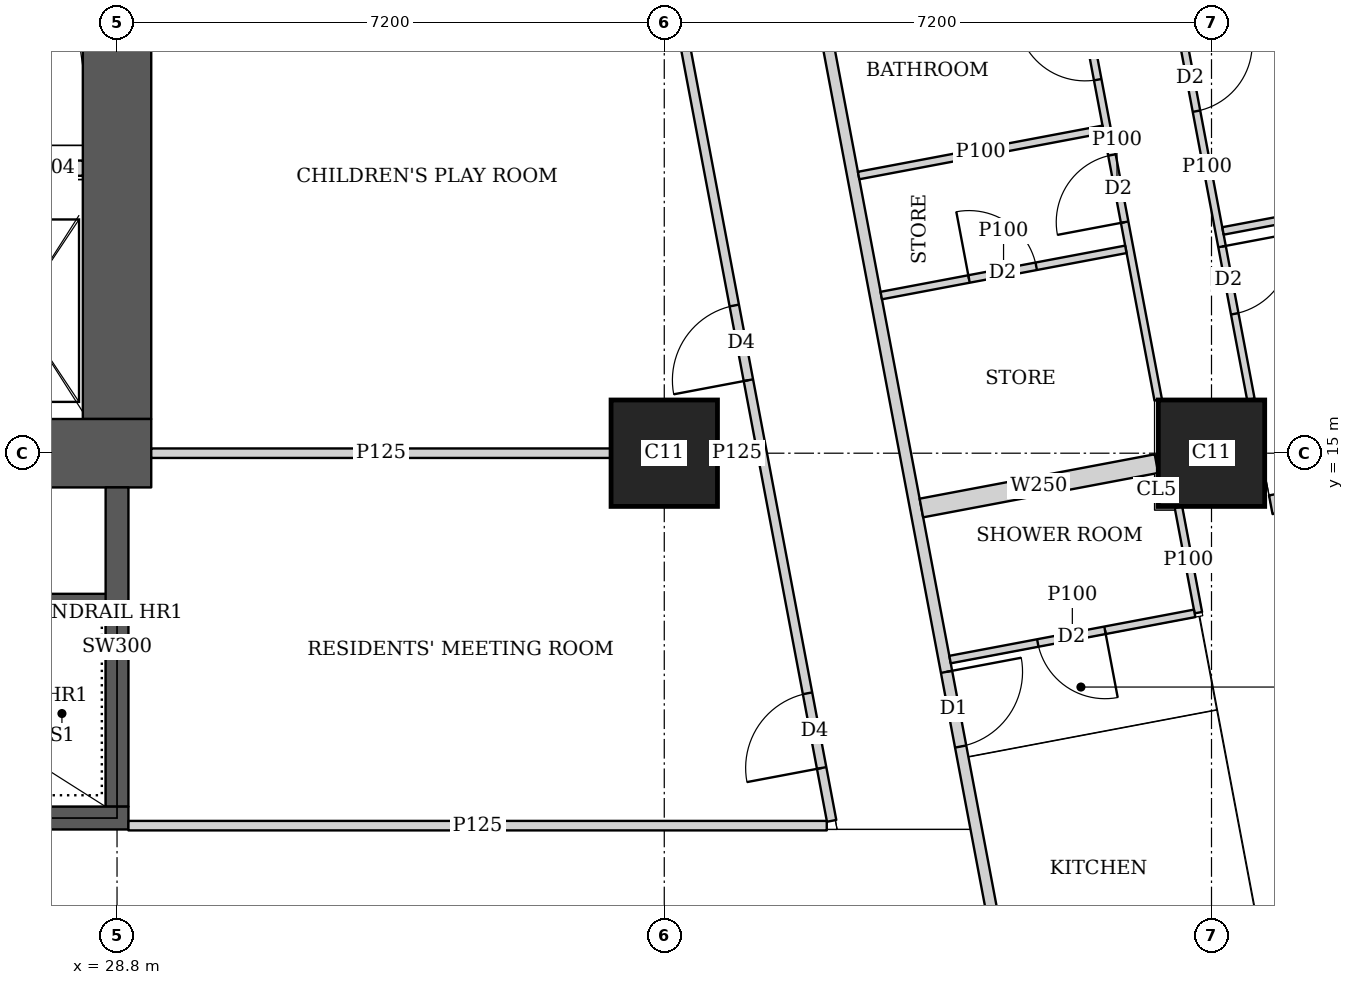
"""IFC4 building model, lengths in metres.
Left out: names, types, materials, properties, quantities, classifications, styles, units other than length and angle.
Written with IfcOpenShell. Run it as: python <this file> out.ifc"""

import sys

from ifc_helpers import new_model, si_unit, direction, frame, frame_2d, origin, origin_2d, place, context, subcontext, project, spatial, rectangle, extrude, element, fill, save


model = new_model("IFC4")
c1 = context("Model", 3, precision=1e-05, world=origin(), true_north=direction((0.0, 1.0)))
c2 = subcontext(c1, "Body", "Model", "MODEL_VIEW")
j1 = project(units=[si_unit("LENGTHUNIT", "METRE"), si_unit("PLANEANGLEUNIT", "RADIAN")], contexts=[c1])
p1 = place(None, origin())
s1 = spatial("IfcSite", under=j1, at=p1, CompositionType="ELEMENT")
p2 = place(p1, origin())
s2 = spatial("IfcBuilding", under=s1, at=p2, CompositionType="ELEMENT")
p3 = place(p2, frame((0.0, 0.0, 270.35)))
s3 = spatial("IfcBuildingStorey", under=s2, at=p3, CompositionType="ELEMENT", Elevation=270.35)
for number, where, z_axis, x_axis in (
    (1, (36.0, 15.0, 0.0), (0.0, 0.0, 1.0), (1.0, 0.0, 0.0)),
    (2, (43.2, 15.0, 0.0), (0.0, 0.0, 1.0), (1.0, 0.0, 0.0)),
):
    element("IfcColumn", number, at=place(p3, frame(where, z_axis=z_axis, x_axis=x_axis)), inside=s3, PredefinedType="COLUMN", context=c2, shape_type="SweptSolid", body=[
        extrude(rectangle(XDim=1.4, YDim=1.4, at=origin_2d()), origin(), (0.0, 0.0, 1.0), 3.75),
    ])
p4 = place(p3, frame((13.95, 15.0, 0.0), z_axis=(0.0, 0.0, 1.0), x_axis=(1.0, 0.0, 0.0)))
e3 = element("IfcWall", 3, at=p4, inside=s3, PredefinedType="SHEAR", context=c2, shape_type="SweptSolid", body=[
    extrude(rectangle(XDim=15.3, YDim=0.9, at=frame_2d((7.65, 0.0))), origin(), (0.0, 0.0, 1.0), 3.75),
])
p5 = place(p4, frame((4.45, 0.0, 0.0)))
e4 = element("IfcOpeningElement", 4, at=p5, cuts=e3, PredefinedType="OPENING", context=c2, shape_type="SweptSolid", body=[
    extrude(rectangle(XDim=1.8, YDim=2.1, at=frame_2d((0.9, 1.05))), frame((0.0, 0.46, 0.0), z_axis=(0.0, -1.0, 0.0), x_axis=(1.0, 0.0, 0.0)), (0.0, 0.0, 1.0), 0.92),
])
p6 = place(p4, frame((10.7, 0.0, 0.0)))
e5 = element("IfcOpeningElement", 5, at=p6, cuts=e3, PredefinedType="OPENING", context=c2, shape_type="SweptSolid", body=[
    extrude(rectangle(XDim=1.1, YDim=2.1, at=frame_2d((0.55, 1.05))), frame((0.0, 0.46, 0.0), z_axis=(0.0, -1.0, 0.0), x_axis=(1.0, 0.0, 0.0)), (0.0, 0.0, 1.0), 0.92),
])
p7 = place(p3, frame((28.8, 15.45, 0.0), z_axis=(0.0, 0.0, 1.0), x_axis=(0.0, 1.0, 0.0)))
e6 = element("IfcWall", 6, at=p7, inside=s3, PredefinedType="SHEAR", context=c2, shape_type="SweptSolid", body=[
    extrude(rectangle(XDim=14.1, YDim=0.9, at=frame_2d((7.05, 0.0))), origin(), (0.0, 0.0, 1.0), 3.75),
])
p8 = place(p3, frame((21.45, 10.2, 0.0), z_axis=(0.0, 0.0, 1.0), x_axis=(1.0, 0.0, 0.0)))
e7 = element("IfcWall", 7, at=p8, inside=s3, PredefinedType="SHEAR", context=c2, shape_type="SweptSolid", body=[
    extrude(rectangle(XDim=7.5, YDim=0.3, at=frame_2d((3.75, 0.0))), origin(), (0.0, 0.0, 1.0), 3.75),
])
p9 = place(p8, frame((1.2, 0.0, 0.0)))
e8 = element("IfcOpeningElement", 8, at=p9, cuts=e7, PredefinedType="OPENING", context=c2, shape_type="SweptSolid", body=[
    extrude(rectangle(XDim=1.1, YDim=2.1, at=frame_2d((0.55, 1.05))), frame((0.0, 0.16, 0.0), z_axis=(0.0, -1.0, 0.0), x_axis=(1.0, 0.0, 0.0)), (0.0, 0.0, 1.0), 0.32),
])
p10 = place(p3, frame((28.8, 10.35, 0.0), z_axis=(0.0, 0.0, 1.0), x_axis=(0.0, 1.0, 0.0)))
e9 = element("IfcWall", 9, at=p10, inside=s3, PredefinedType="SHEAR", context=c2, shape_type="SweptSolid", body=[
    extrude(rectangle(XDim=4.2, YDim=0.3, at=frame_2d((2.1, 0.0))), origin(), (0.0, 0.0, 1.0), 3.75),
])
p11 = place(p3, frame((49.684, 7.832, 0.0), z_axis=(0.0, 0.0, 1.0), x_axis=(-0.185616669694, 0.982622232565, 0.0)))
e10 = element("IfcWall", 10, at=p11, inside=s3, PredefinedType="SOLIDWALL", context=c2, shape_type="SweptSolid", body=[
    extrude(rectangle(XDim=36.0, YDim=0.2, at=frame_2d((18.0, 0.0))), origin(), (0.0, 0.0, 1.0), 3.5),
])
p12 = place(p11, frame((2.518, 0.0, 0.9)))
e11 = element("IfcOpeningElement", 11, at=p12, cuts=e10, PredefinedType="OPENING", context=c2, shape_type="SweptSolid", body=[
    extrude(rectangle(XDim=2.4, YDim=1.5, at=frame_2d((1.2, 0.75))), frame((0.0, 0.11, 0.0), z_axis=(0.0, -1.0, 0.0), x_axis=(1.0, 0.0, 0.0)), (0.0, 0.0, 1.0), 0.22),
])
p13 = place(p11, frame((8.444, 0.0, 0.9)))
e12 = element("IfcOpeningElement", 12, at=p13, cuts=e10, PredefinedType="OPENING", context=c2, shape_type="SweptSolid", body=[
    extrude(rectangle(XDim=1.8, YDim=1.5, at=frame_2d((0.9, 0.75))), frame((0.0, 0.11, 0.0), z_axis=(0.0, -1.0, 0.0), x_axis=(1.0, 0.0, 0.0)), (0.0, 0.0, 1.0), 0.22),
])
p14 = place(p11, frame((12.261, 0.0, 0.9)))
e13 = element("IfcOpeningElement", 13, at=p14, cuts=e10, PredefinedType="OPENING", context=c2, shape_type="SweptSolid", body=[
    extrude(rectangle(XDim=1.8, YDim=1.5, at=frame_2d((0.9, 0.75))), frame((0.0, 0.11, 0.0), z_axis=(0.0, -1.0, 0.0), x_axis=(1.0, 0.0, 0.0)), (0.0, 0.0, 1.0), 0.22),
])
p15 = place(p11, frame((16.078, 0.0, 0.9)))
e14 = element("IfcOpeningElement", 14, at=p15, cuts=e10, PredefinedType="OPENING", context=c2, shape_type="SweptSolid", body=[
    extrude(rectangle(XDim=1.8, YDim=1.5, at=frame_2d((0.9, 0.75))), frame((0.0, 0.11, 0.0), z_axis=(0.0, -1.0, 0.0), x_axis=(1.0, 0.0, 0.0)), (0.0, 0.0, 1.0), 0.22),
])
p16 = place(p11, frame((19.894, 0.0, 0.9)))
e15 = element("IfcOpeningElement", 15, at=p16, cuts=e10, PredefinedType="OPENING", context=c2, shape_type="SweptSolid", body=[
    extrude(rectangle(XDim=1.8, YDim=1.5, at=frame_2d((0.9, 0.75))), frame((0.0, 0.11, 0.0), z_axis=(0.0, -1.0, 0.0), x_axis=(1.0, 0.0, 0.0)), (0.0, 0.0, 1.0), 0.22),
])
p17 = place(p11, frame((23.71, 0.0, 0.9)))
e16 = element("IfcOpeningElement", 16, at=p17, cuts=e10, PredefinedType="OPENING", context=c2, shape_type="SweptSolid", body=[
    extrude(rectangle(XDim=1.8, YDim=1.5, at=frame_2d((0.9, 0.75))), frame((0.0, 0.11, 0.0), z_axis=(0.0, -1.0, 0.0), x_axis=(1.0, 0.0, 0.0)), (0.0, 0.0, 1.0), 0.22),
])
p18 = place(p11, frame((27.526, 0.0, 0.9)))
e17 = element("IfcOpeningElement", 17, at=p18, cuts=e10, PredefinedType="OPENING", context=c2, shape_type="SweptSolid", body=[
    extrude(rectangle(XDim=1.8, YDim=1.5, at=frame_2d((0.9, 0.75))), frame((0.0, 0.11, 0.0), z_axis=(0.0, -1.0, 0.0), x_axis=(1.0, 0.0, 0.0)), (0.0, 0.0, 1.0), 0.22),
])
p19 = place(p11, frame((32.046, 0.0, 0.9)))
e18 = element("IfcOpeningElement", 18, at=p19, cuts=e10, PredefinedType="OPENING", context=c2, shape_type="SweptSolid", body=[
    extrude(rectangle(XDim=1.8, YDim=1.5, at=frame_2d((0.9, 0.75))), frame((0.0, 0.11, 0.0), z_axis=(0.0, -1.0, 0.0), x_axis=(1.0, 0.0, 0.0)), (0.0, 0.0, 1.0), 0.22),
])
p20 = place(p3, frame((34.036, 42.186, 0.0), z_axis=(0.0, 0.0, 1.0), x_axis=(0.185593518645, -0.9826266055, 0.0)))
e19 = element("IfcWall", 19, at=p20, inside=s3, PredefinedType="SOLIDWALL", context=c2, shape_type="SweptSolid", body=[
    extrude(rectangle(XDim=35.961, YDim=0.15, at=frame_2d((17.98, 0.0))), origin(), (0.0, 0.0, 1.0), 2.5),
])
p21 = place(p20, frame((15.529, 0.0, 0.0)))
e20 = element("IfcOpeningElement", 20, at=p21, cuts=e19, PredefinedType="OPENING", context=c2, shape_type="SweptSolid", body=[
    extrude(rectangle(XDim=1.0, YDim=2.1, at=frame_2d((0.5, 1.05))), frame((0.0, 0.085, 0.0), z_axis=(0.0, -1.0, 0.0), x_axis=(1.0, 0.0, 0.0)), (0.0, 0.0, 1.0), 0.17),
])
p22 = place(p20, frame((19.345, 0.0, 0.0)))
e21 = element("IfcOpeningElement", 21, at=p22, cuts=e19, PredefinedType="OPENING", context=c2, shape_type="SweptSolid", body=[
    extrude(rectangle(XDim=1.0, YDim=2.1, at=frame_2d((0.5, 1.05))), frame((0.0, 0.085, 0.0), z_axis=(0.0, -1.0, 0.0), x_axis=(1.0, 0.0, 0.0)), (0.0, 0.0, 1.0), 0.17),
])
p23 = place(p20, frame((30.594, 0.0, 0.0)))
e22 = element("IfcOpeningElement", 22, at=p23, cuts=e19, PredefinedType="OPENING", context=c2, shape_type="SweptSolid", body=[
    extrude(rectangle(XDim=1.0, YDim=2.1, at=frame_2d((0.5, 1.05))), frame((0.0, 0.085, 0.0), z_axis=(0.0, -1.0, 0.0), x_axis=(1.0, 0.0, 0.0)), (0.0, 0.0, 1.0), 0.17),
])
p24 = place(p3, frame((42.566, 21.809, 0.0), z_axis=(0.0, 0.0, 1.0), x_axis=(0.185613526435, -0.98262282632, 0.0)))
e23 = element("IfcWall", 23, at=p24, inside=s3, PredefinedType="PARTITIONING", context=c2, shape_type="SweptSolid", body=[
    extrude(rectangle(XDim=6.207, YDim=0.1, at=frame_2d((3.104, 0.0))), origin(), (0.0, 0.0, 1.0), 2.5),
])
p25 = place(p24, frame((1.45, 0.0, 0.0)))
e24 = element("IfcOpeningElement", 24, at=p25, cuts=e23, PredefinedType="OPENING", context=c2, shape_type="SweptSolid", body=[
    extrude(rectangle(XDim=0.9, YDim=2.1, at=frame_2d((0.45, 1.05))), frame((0.0, 0.06, 0.0), z_axis=(0.0, -1.0, 0.0), x_axis=(1.0, 0.0, 0.0)), (0.0, 0.0, 1.0), 0.12),
])
p26 = place(p24, frame((4.163, 0.0, 0.0)))
e25 = element("IfcOpeningElement", 25, at=p26, cuts=e23, PredefinedType="OPENING", context=c2, shape_type="SweptSolid", body=[
    extrude(rectangle(XDim=0.9, YDim=2.1, at=frame_2d((0.45, 1.05))), frame((0.0, 0.06, 0.0), z_axis=(0.0, -1.0, 0.0), x_axis=(1.0, 0.0, 0.0)), (0.0, 0.0, 1.0), 0.12),
])
p27 = place(p3, frame((41.414, 21.442, 0.0), z_axis=(0.0, 0.0, 1.0), x_axis=(0.185698675093, -0.982606738257, 0.0)))
e26 = element("IfcWall", 26, at=p27, inside=s3, PredefinedType="PARTITIONING", context=c2, shape_type="SweptSolid", body=[
    extrude(rectangle(XDim=5.843, YDim=0.1, at=frame_2d((2.921, 0.0))), origin(), (0.0, 0.0, 1.0), 3.5),
])
p28 = place(p27, frame((0.655, 0.0, 0.0)))
e27 = element("IfcOpeningElement", 27, at=p28, cuts=e26, PredefinedType="OPENING", context=c2, shape_type="SweptSolid", body=[
    extrude(rectangle(XDim=0.9, YDim=2.1, at=frame_2d((0.45, 1.05))), frame((0.0, 0.06, 0.0), z_axis=(0.0, -1.0, 0.0), x_axis=(1.0, 0.0, 0.0)), (0.0, 0.0, 1.0), 0.12),
])
p29 = place(p27, frame((2.563, 0.0, 0.0)))
e28 = element("IfcOpeningElement", 28, at=p29, cuts=e26, PredefinedType="OPENING", context=c2, shape_type="SweptSolid", body=[
    extrude(rectangle(XDim=0.9, YDim=2.1, at=frame_2d((0.45, 1.05))), frame((0.0, 0.06, 0.0), z_axis=(0.0, -1.0, 0.0), x_axis=(1.0, 0.0, 0.0)), (0.0, 0.0, 1.0), 0.12),
])
p30 = place(p3, frame((47.527, 18.712, 0.0), z_axis=(0.0, 0.0, 1.0), x_axis=(-0.982665405803, -0.185387972203, 0.0)))
e29 = element("IfcWall", 29, at=p30, inside=s3, PredefinedType="PARTITIONING", context=c2, shape_type="SweptSolid", body=[
    extrude(rectangle(XDim=4.25, YDim=0.1, at=frame_2d((2.125, 0.0))), origin(), (0.0, 0.0, 1.0), 2.5),
])
p31 = place(p3, frame((42.073, 17.682, 0.0), z_axis=(0.0, 0.0, 1.0), x_axis=(-0.982620626894, -0.185625169636, 0.0)))
e30 = element("IfcWall", 30, at=p31, inside=s3, PredefinedType="PARTITIONING", context=c2, shape_type="SweptSolid", body=[
    extrude(rectangle(XDim=3.275, YDim=0.1, at=frame_2d((1.637, 0.0))), origin(), (0.0, 0.0, 1.0), 3.5),
])
p32 = place(p31, frame((1.2, 0.0, 0.0)))
e31 = element("IfcOpeningElement", 31, at=p32, cuts=e30, PredefinedType="OPENING", context=c2, shape_type="SweptSolid", body=[
    extrude(rectangle(XDim=0.9, YDim=2.1, at=frame_2d((0.45, 1.05))), frame((0.0, 0.06, 0.0), z_axis=(0.0, -1.0, 0.0), x_axis=(1.0, 0.0, 0.0)), (0.0, 0.0, 1.0), 0.12),
])
p33 = place(p3, frame((41.775, 19.261, 0.0), z_axis=(0.0, 0.0, 1.0), x_axis=(-0.982620626894, -0.185625169636, 0.0)))
e32 = element("IfcWall", 32, at=p33, inside=s3, PredefinedType="PARTITIONING", context=c2, shape_type="SweptSolid", body=[
    extrude(rectangle(XDim=3.275, YDim=0.1, at=frame_2d((1.637, 0.0))), origin(), (0.0, 0.0, 1.0), 3.5),
])
p34 = place(p3, frame((42.765, 14.29, 0.0), z_axis=(0.0, 0.0, 1.0), x_axis=(0.185634589628, -0.982618847333, 0.0)))
e33 = element("IfcWall", 33, at=p34, inside=s3, PredefinedType="PARTITIONING", context=c2, shape_type="SweptSolid", body=[
    extrude(rectangle(XDim=1.413, YDim=0.1, at=frame_2d((0.706, 0.0))), origin(), (0.0, 0.0, 1.0), 3.5),
])
p35 = place(p3, frame((42.978, 12.893, 0.0), z_axis=(0.0, 0.0, 1.0), x_axis=(-0.982607026909, -0.185697147715, 0.0)))
e34 = element("IfcWall", 34, at=p35, inside=s3, PredefinedType="PARTITIONING", context=c2, shape_type="SweptSolid", body=[
    extrude(rectangle(XDim=3.275, YDim=0.1, at=frame_2d((1.637, 0.0))), origin(), (0.0, 0.0, 1.0), 3.5),
])
p36 = place(p35, frame((1.2, 0.0, 0.0)))
e35 = element("IfcOpeningElement", 35, at=p36, cuts=e34, PredefinedType="OPENING", context=c2, shape_type="SweptSolid", body=[
    extrude(rectangle(XDim=0.9, YDim=2.1, at=frame_2d((0.45, 1.05))), frame((0.0, 0.06, 0.0), z_axis=(0.0, -1.0, 0.0), x_axis=(1.0, 0.0, 0.0)), (0.0, 0.0, 1.0), 0.12),
])
p37 = place(p3, frame((45.29, 14.569, 0.0), z_axis=(0.0, 0.0, 1.0), x_axis=(-0.982676759201, -0.185327782391, 0.0)))
e36 = element("IfcWall", 36, at=p37, inside=s3, PredefinedType="SOLIDWALL", context=c2, shape_type="SweptSolid", body=[
    extrude(rectangle(XDim=1.333, YDim=0.25, at=frame_2d((0.667, 0.0))), origin(), (0.0, 0.0, 1.0), 3.5),
])
p38 = place(p3, frame((42.476, 14.863, 0.0), z_axis=(0.0, 0.0, 1.0), x_axis=(-0.982638716117, -0.185529387398, 0.0)))
e37 = element("IfcWall", 37, at=p38, inside=s3, PredefinedType="SOLIDWALL", context=c2, shape_type="SweptSolid", body=[
    extrude(rectangle(XDim=3.148, YDim=0.25, at=frame_2d((1.574, 0.0))), origin(), (0.0, 0.0, 1.0), 3.5),
])
p39 = place(p3, frame((28.95, 10.1, 0.0), z_axis=(0.0, 0.0, 1.0), x_axis=(1.0, 0.0, 0.0)))
e38 = element("IfcWall", 38, at=p39, inside=s3, PredefinedType="PARTITIONING", context=c2, shape_type="SweptSolid", body=[
    extrude(rectangle(XDim=9.188, YDim=0.125, at=frame_2d((4.594, 0.0))), origin(), (0.0, 0.0, 1.0), 3.5),
])
p40 = place(p3, frame((38.202, 10.163, 0.0), z_axis=(0.0, 0.0, 1.0), x_axis=(-0.185610321132, 0.982623431783, 0.0)))
e39 = element("IfcWall", 39, at=p40, inside=s3, PredefinedType="PARTITIONING", context=c2, shape_type="SweptSolid", body=[
    extrude(rectangle(XDim=25.111, YDim=0.125, at=frame_2d((12.556, 0.0))), origin(), (0.0, 0.0, 1.0), 2.5),
])
p41 = place(p40, frame((0.708, 0.0, 0.0)))
e40 = element("IfcOpeningElement", 40, at=p41, cuts=e39, PredefinedType="OPENING", context=c2, shape_type="SweptSolid", body=[
    extrude(rectangle(XDim=1.0, YDim=2.1, at=frame_2d((0.5, 1.05))), frame((0.0, 0.073, 0.0), z_axis=(0.0, -1.0, 0.0), x_axis=(1.0, 0.0, 0.0)), (0.0, 0.0, 1.0), 0.145),
])
p42 = place(p40, frame((5.9, 0.0, 0.0)))
e41 = element("IfcOpeningElement", 41, at=p42, cuts=e39, PredefinedType="OPENING", context=c2, shape_type="SweptSolid", body=[
    extrude(rectangle(XDim=1.0, YDim=2.1, at=frame_2d((0.5, 1.05))), frame((0.0, 0.073, 0.0), z_axis=(0.0, -1.0, 0.0), x_axis=(1.0, 0.0, 0.0)), (0.0, 0.0, 1.0), 0.145),
])
p43 = place(p40, frame((13.378, 0.0, 0.0)))
e42 = element("IfcOpeningElement", 42, at=p43, cuts=e39, PredefinedType="OPENING", context=c2, shape_type="SweptSolid", body=[
    extrude(rectangle(XDim=1.0, YDim=2.1, at=frame_2d((0.5, 1.05))), frame((0.0, 0.073, 0.0), z_axis=(0.0, -1.0, 0.0), x_axis=(1.0, 0.0, 0.0)), (0.0, 0.0, 1.0), 0.145),
])
p44 = place(p40, frame((17.194, 0.0, 0.0)))
e43 = element("IfcOpeningElement", 43, at=p44, cuts=e39, PredefinedType="OPENING", context=c2, shape_type="SweptSolid", body=[
    extrude(rectangle(XDim=1.0, YDim=2.1, at=frame_2d((0.5, 1.05))), frame((0.0, 0.073, 0.0), z_axis=(0.0, -1.0, 0.0), x_axis=(1.0, 0.0, 0.0)), (0.0, 0.0, 1.0), 0.145),
])
p45 = place(p40, frame((21.15, 0.0, 0.0)))
e44 = element("IfcOpeningElement", 44, at=p45, cuts=e39, PredefinedType="OPENING", context=c2, shape_type="SweptSolid", body=[
    extrude(rectangle(XDim=1.0, YDim=2.1, at=frame_2d((0.5, 1.05))), frame((0.0, 0.073, 0.0), z_axis=(0.0, -1.0, 0.0), x_axis=(1.0, 0.0, 0.0)), (0.0, 0.0, 1.0), 0.145),
])
p46 = place(p3, frame((29.25, 15.0, 0.0), z_axis=(0.0, 0.0, 1.0), x_axis=(1.0, 0.0, 0.0)))
e45 = element("IfcWall", 45, at=p46, inside=s3, PredefinedType="PARTITIONING", context=c2, shape_type="SweptSolid", body=[
    extrude(rectangle(XDim=6.049, YDim=0.125, at=frame_2d((3.024, 0.0))), origin(), (0.0, 0.0, 1.0), 3.5),
])
p47 = place(p3, frame((36.701, 15.0, 0.0), z_axis=(0.0, 0.0, 1.0), x_axis=(1.0, 0.0, 0.0)))
e46 = element("IfcWall", 46, at=p47, inside=s3, PredefinedType="PARTITIONING", context=c2, shape_type="SweptSolid", body=[
    extrude(rectangle(XDim=0.512, YDim=0.125, at=frame_2d((0.256, 0.0))), origin(), (0.0, 0.0, 1.0), 3.5),
])
p48 = place(p3, frame((23.0, 13.05, 0.0), z_axis=(0.0, 0.0, 1.0), x_axis=(1.0, 0.0, 0.0)))
e47 = element("IfcWall", 47, at=p48, inside=s3, PredefinedType="SHEAR", context=c2, shape_type="SweptSolid", body=[
    extrude(rectangle(XDim=5.8, YDim=0.2, at=frame_2d((2.9, 0.0))), origin(), (0.0, 0.0, 1.0), 3.75),
])
p49 = place(p3, frame((27.4, 18.75, 0.0), z_axis=(0.0, 0.0, 1.0), x_axis=(1.0, 0.0, 0.0)))
e48 = element("IfcWall", 48, at=p49, inside=s3, PredefinedType="SOLIDWALL", context=c2, shape_type="SweptSolid", body=[
    extrude(rectangle(XDim=0.95, YDim=0.2, at=frame_2d((0.475, 0.0))), origin(), (0.0, 0.0, 1.0), 3.5),
])
p50 = place(p25, origin())
e49 = element("IfcDoor", 49, at=p50, inside=s3, OperationType="SINGLE_SWING_LEFT", PredefinedType="DOOR", context=c2, shape_type="SweptSolid", body=[
    extrude(rectangle(XDim=0.9, YDim=2.1, at=frame_2d((0.45, 1.05))), frame((0.0, 0.025, 0.0), z_axis=(0.0, -1.0, 0.0), x_axis=(1.0, 0.0, 0.0)), (0.0, 0.0, 1.0), 0.05),
])
fill(e24, e49)
p51 = place(p26, origin())
e50 = element("IfcDoor", 50, at=p51, inside=s3, OperationType="SINGLE_SWING_LEFT", PredefinedType="DOOR", context=c2, shape_type="SweptSolid", body=[
    extrude(rectangle(XDim=0.9, YDim=2.1, at=frame_2d((0.45, 1.05))), frame((0.0, 0.025, 0.0), z_axis=(0.0, -1.0, 0.0), x_axis=(1.0, 0.0, 0.0)), (0.0, 0.0, 1.0), 0.05),
])
fill(e25, e50)
p52 = place(p28, origin())
e51 = element("IfcDoor", 51, at=p52, inside=s3, OperationType="SINGLE_SWING_RIGHT", PredefinedType="DOOR", context=c2, shape_type="SweptSolid", body=[
    extrude(rectangle(XDim=0.9, YDim=2.1, at=frame_2d((0.45, 1.05))), frame((0.0, 0.025, 0.0), z_axis=(0.0, -1.0, 0.0), x_axis=(1.0, 0.0, 0.0)), (0.0, 0.0, 1.0), 0.05),
])
fill(e27, e51)
p53 = place(p29, origin())
e52 = element("IfcDoor", 52, at=p53, inside=s3, OperationType="SINGLE_SWING_LEFT", PredefinedType="DOOR", context=c2, shape_type="SweptSolid", body=[
    extrude(rectangle(XDim=0.9, YDim=2.1, at=frame_2d((0.45, 1.05))), frame((0.0, 0.025, 0.0), z_axis=(0.0, -1.0, 0.0), x_axis=(1.0, 0.0, 0.0)), (0.0, 0.0, 1.0), 0.05),
])
fill(e28, e52)
p54 = place(p36, origin())
e53 = element("IfcDoor", 53, at=p54, inside=s3, OperationType="SINGLE_SWING_LEFT", PredefinedType="DOOR", context=c2, shape_type="SweptSolid", body=[
    extrude(rectangle(XDim=0.9, YDim=2.1, at=frame_2d((0.45, 1.05))), frame((0.0, 0.025, 0.0), z_axis=(0.0, -1.0, 0.0), x_axis=(1.0, 0.0, 0.0)), (0.0, 0.0, 1.0), 0.05),
])
fill(e35, e53)
p55 = place(p23, origin())
e54 = element("IfcDoor", 54, at=p55, inside=s3, OperationType="SINGLE_SWING_LEFT", PredefinedType="DOOR", context=c2, shape_type="SweptSolid", body=[
    extrude(rectangle(XDim=1.0, YDim=2.1, at=frame_2d((0.5, 1.05))), frame((0.0, 0.025, 0.0), z_axis=(0.0, -1.0, 0.0), x_axis=(1.0, 0.0, 0.0)), (0.0, 0.0, 1.0), 0.05),
])
fill(e22, e54)
p56 = place(p32, origin())
e55 = element("IfcDoor", 55, at=p56, inside=s3, OperationType="SINGLE_SWING_LEFT", PredefinedType="DOOR", context=c2, shape_type="SweptSolid", body=[
    extrude(rectangle(XDim=0.9, YDim=2.1, at=frame_2d((0.45, 1.05))), frame((0.0, 0.025, 0.0), z_axis=(0.0, -1.0, 0.0), x_axis=(1.0, 0.0, 0.0)), (0.0, 0.0, 1.0), 0.05),
])
fill(e31, e55)
p57 = place(p41, origin())
e56 = element("IfcDoor", 56, at=p57, inside=s3, OperationType="SINGLE_SWING_LEFT", PredefinedType="DOOR", context=c2, shape_type="SweptSolid", body=[
    extrude(rectangle(XDim=1.0, YDim=2.1, at=frame_2d((0.5, 1.05))), frame((0.0, 0.025, 0.0), z_axis=(0.0, -1.0, 0.0), x_axis=(1.0, 0.0, 0.0)), (0.0, 0.0, 1.0), 0.05),
])
fill(e40, e56)
p58 = place(p42, origin())
e57 = element("IfcDoor", 57, at=p58, inside=s3, OperationType="SINGLE_SWING_LEFT", PredefinedType="DOOR", context=c2, shape_type="SweptSolid", body=[
    extrude(rectangle(XDim=1.0, YDim=2.1, at=frame_2d((0.5, 1.05))), frame((0.0, 0.025, 0.0), z_axis=(0.0, -1.0, 0.0), x_axis=(1.0, 0.0, 0.0)), (0.0, 0.0, 1.0), 0.05),
])
fill(e41, e57)
save(model, sys.argv[1])
